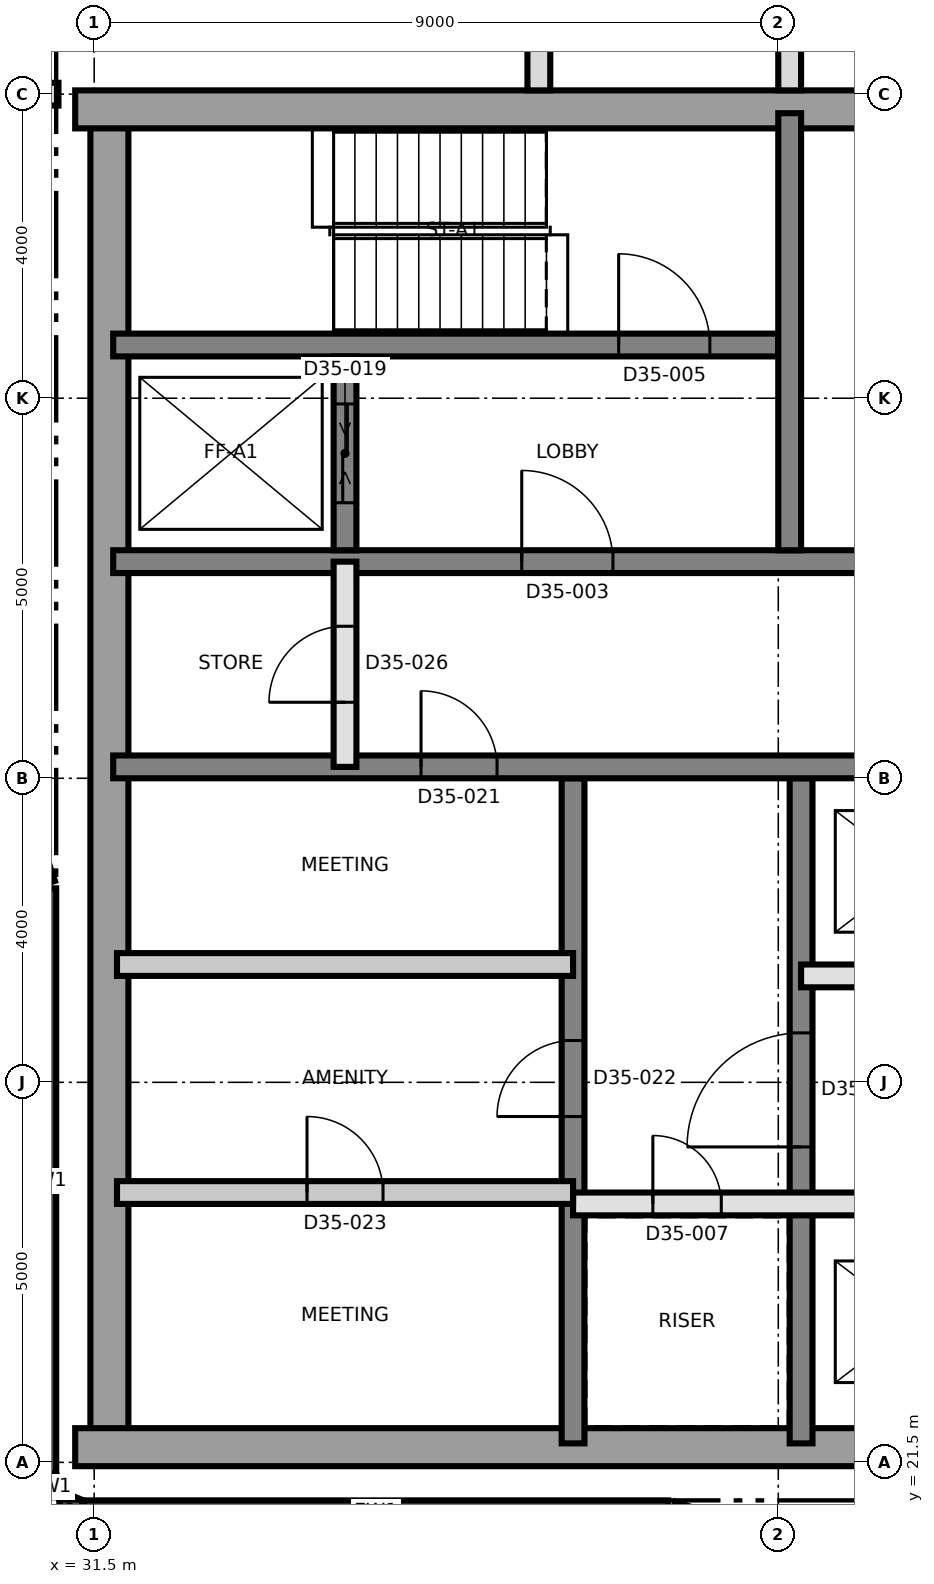
"""IFC4 building model, lengths in metres.
Left out: names, types, materials, properties, quantities, classifications, styles, units other than length and angle.
Written with IfcOpenShell. Run it as: python <this file> out.ifc"""

import sys

from ifc_helpers import new_model, si_unit, direction, frame, frame_2d, origin, place, context, subcontext, project, spatial, rectangle, extrude, element, fill, save


model = new_model("IFC4")
c1 = context("Model", 3, precision=1e-05, world=origin(), true_north=direction((0.0, 1.0)))
c2 = subcontext(c1, "Body", "Model", "MODEL_VIEW")
j1 = project(units=[si_unit("LENGTHUNIT", "METRE"), si_unit("PLANEANGLEUNIT", "RADIAN")], contexts=[c1])
p1 = place(None, origin())
s1 = spatial("IfcSite", under=j1, at=p1, CompositionType="ELEMENT")
p2 = place(p1, origin())
s2 = spatial("IfcBuilding", under=s1, at=p2, CompositionType="ELEMENT")
p3 = place(p2, frame((0.0, 0.0, 195.8)))
s3 = spatial("IfcBuildingStorey", under=s2, at=p3, CompositionType="ELEMENT", Elevation=195.8)
p4 = place(p3, frame((31.7, 21.75, 0.0), z_axis=(0.0, 0.0, 1.0), x_axis=(0.0, 1.0, 0.0)))
e1 = element("IfcWall", 1, at=p4, inside=s3, PredefinedType="SHEAR", context=c2, shape_type="SweptSolid", body=[
    extrude(rectangle(XDim=17.5, YDim=0.5, at=frame_2d((8.75, 0.0))), origin(), (0.0, 0.0, 1.0), 3.7),
])
p5 = place(p3, frame((31.25, 21.7, 0.0), z_axis=(0.0, 0.0, 1.0), x_axis=(1.0, 0.0, 0.0)))
e2 = element("IfcWall", 2, at=p5, inside=s3, PredefinedType="SHEAR", context=c2, shape_type="SweptSolid", body=[
    extrude(rectangle(XDim=27.0, YDim=0.5, at=frame_2d((13.5, 0.0))), origin(), (0.0, 0.0, 1.0), 3.7),
])
p6 = place(p3, frame((31.25, 39.3, 0.0), z_axis=(0.0, 0.0, 1.0), x_axis=(1.0, 0.0, 0.0)))
e3 = element("IfcWall", 3, at=p6, inside=s3, PredefinedType="SHEAR", context=c2, shape_type="SweptSolid", body=[
    extrude(rectangle(XDim=27.0, YDim=0.5, at=frame_2d((13.5, 0.0))), origin(), (0.0, 0.0, 1.0), 3.7),
])
p7 = place(p6, frame((10.45, 0.0, 0.0)))
e4 = element("IfcOpeningElement", 4, at=p7, cuts=e3, PredefinedType="OPENING", context=c2, shape_type="SweptSolid", body=[
    extrude(rectangle(XDim=1.2, YDim=2.1, at=frame_2d((0.6, 1.05))), frame((0.0, 0.26, 0.0), z_axis=(0.0, -1.0, 0.0), x_axis=(1.0, 0.0, 0.0)), (0.0, 0.0, 1.0), 0.52),
])
p8 = place(p3, frame((37.8, 21.75, 0.0), z_axis=(0.0, 0.0, 1.0), x_axis=(0.0, 1.0, 0.0)))
e5 = element("IfcWall", 5, at=p8, inside=s3, PredefinedType="SHEAR", context=c2, shape_type="SweptSolid", body=[
    extrude(rectangle(XDim=8.75, YDim=0.3, at=frame_2d((4.375, 0.0))), origin(), (0.0, 0.0, 1.0), 3.7),
])
p9 = place(p8, frame((4.3, 0.0, 0.0)))
e6 = element("IfcOpeningElement", 6, at=p9, cuts=e5, PredefinedType="OPENING", context=c2, shape_type="SweptSolid", body=[
    extrude(rectangle(XDim=1.0, YDim=2.1, at=frame_2d((0.5, 1.05))), frame((0.0, 0.16, 0.0), z_axis=(0.0, -1.0, 0.0), x_axis=(1.0, 0.0, 0.0)), (0.0, 0.0, 1.0), 0.32),
])
p10 = place(p3, frame((40.8, 21.75, 0.0), z_axis=(0.0, 0.0, 1.0), x_axis=(0.0, 1.0, 0.0)))
e7 = element("IfcWall", 7, at=p10, inside=s3, PredefinedType="SHEAR", context=c2, shape_type="SweptSolid", body=[
    extrude(rectangle(XDim=8.75, YDim=0.3, at=frame_2d((4.375, 0.0))), origin(), (0.0, 0.0, 1.0), 3.7),
])
p11 = place(p10, frame((3.9, 0.0, 0.0)))
e8 = element("IfcOpeningElement", 8, at=p11, cuts=e7, PredefinedType="OPENING", context=c2, shape_type="SweptSolid", body=[
    extrude(rectangle(XDim=1.5, YDim=2.1, at=frame_2d((0.75, 1.05))), frame((0.0, 0.16, 0.0), z_axis=(0.0, -1.0, 0.0), x_axis=(1.0, 0.0, 0.0)), (0.0, 0.0, 1.0), 0.32),
])
p12 = place(p3, frame((31.75, 30.65, 0.0), z_axis=(0.0, 0.0, 1.0), x_axis=(1.0, 0.0, 0.0)))
e9 = element("IfcWall", 9, at=p12, inside=s3, PredefinedType="SHEAR", context=c2, shape_type="SweptSolid", body=[
    extrude(rectangle(XDim=26.5, YDim=0.3, at=frame_2d((13.25, 0.0))), origin(), (0.0, 0.0, 1.0), 3.7),
])
p13 = place(p12, frame((24.75, 0.0, 0.0)))
e10 = element("IfcOpeningElement", 10, at=p13, cuts=e9, PredefinedType="OPENING", context=c2, shape_type="SweptSolid", body=[
    extrude(rectangle(XDim=1.0, YDim=2.1, at=frame_2d((0.5, 1.05))), frame((0.0, 0.16, 0.0), z_axis=(0.0, -1.0, 0.0), x_axis=(1.0, 0.0, 0.0)), (0.0, 0.0, 1.0), 0.32),
])
p14 = place(p12, frame((4.05, 0.0, 0.0)))
e11 = element("IfcOpeningElement", 11, at=p14, cuts=e9, PredefinedType="OPENING", context=c2, shape_type="SweptSolid", body=[
    extrude(rectangle(XDim=1.0, YDim=2.1, at=frame_2d((0.5, 1.05))), frame((0.0, 0.16, 0.0), z_axis=(0.0, -1.0, 0.0), x_axis=(1.0, 0.0, 0.0)), (0.0, 0.0, 1.0), 0.32),
])
p15 = place(p3, frame((31.75, 33.35, 0.0), z_axis=(0.0, 0.0, 1.0), x_axis=(1.0, 0.0, 0.0)))
e12 = element("IfcWall", 12, at=p15, inside=s3, PredefinedType="SHEAR", context=c2, shape_type="SweptSolid", body=[
    extrude(rectangle(XDim=26.5, YDim=0.3, at=frame_2d((13.25, 0.0))), origin(), (0.0, 0.0, 1.0), 3.7),
])
p16 = place(p15, frame((13.9, 0.0, 0.0)))
e13 = element("IfcOpeningElement", 13, at=p16, cuts=e12, PredefinedType="OPENING", context=c2, shape_type="SweptSolid", body=[
    extrude(rectangle(XDim=1.4, YDim=2.1, at=frame_2d((0.7, 1.05))), frame((0.0, 0.16, 0.0), z_axis=(0.0, -1.0, 0.0), x_axis=(1.0, 0.0, 0.0)), (0.0, 0.0, 1.0), 0.32),
])
p17 = place(p15, frame((5.375, 0.0, 0.0)))
e14 = element("IfcOpeningElement", 14, at=p17, cuts=e12, PredefinedType="OPENING", context=c2, shape_type="SweptSolid", body=[
    extrude(rectangle(XDim=1.2, YDim=2.1, at=frame_2d((0.6, 1.05))), frame((0.0, 0.16, 0.0), z_axis=(0.0, -1.0, 0.0), x_axis=(1.0, 0.0, 0.0)), (0.0, 0.0, 1.0), 0.32),
])
p18 = place(p15, frame((19.925, 0.0, 0.0)))
e15 = element("IfcOpeningElement", 15, at=p18, cuts=e12, PredefinedType="OPENING", context=c2, shape_type="SweptSolid", body=[
    extrude(rectangle(XDim=1.2, YDim=2.1, at=frame_2d((0.6, 1.05))), frame((0.0, 0.16, 0.0), z_axis=(0.0, -1.0, 0.0), x_axis=(1.0, 0.0, 0.0)), (0.0, 0.0, 1.0), 0.32),
])
p19 = place(p3, frame((31.75, 36.2, 0.0), z_axis=(0.0, 0.0, 1.0), x_axis=(1.0, 0.0, 0.0)))
e16 = element("IfcWall", 16, at=p19, inside=s3, PredefinedType="SHEAR", context=c2, shape_type="SweptSolid", body=[
    extrude(rectangle(XDim=8.75, YDim=0.3, at=frame_2d((4.375, 0.0))), origin(), (0.0, 0.0, 1.0), 3.7),
])
p20 = place(p19, frame((6.65, 0.0, 0.0)))
e17 = element("IfcOpeningElement", 17, at=p20, cuts=e16, PredefinedType="OPENING", context=c2, shape_type="SweptSolid", body=[
    extrude(rectangle(XDim=1.2, YDim=2.1, at=frame_2d((0.6, 1.05))), frame((0.0, 0.16, 0.0), z_axis=(0.0, -1.0, 0.0), x_axis=(1.0, 0.0, 0.0)), (0.0, 0.0, 1.0), 0.32),
])
p21 = place(p3, frame((40.65, 33.5, 0.0), z_axis=(0.0, 0.0, 1.0), x_axis=(0.0, 1.0, 0.0)))
e18 = element("IfcWall", 18, at=p21, inside=s3, PredefinedType="SHEAR", context=c2, shape_type="SweptSolid", body=[
    extrude(rectangle(XDim=5.75, YDim=0.3, at=frame_2d((2.875, 0.0))), origin(), (0.0, 0.0, 1.0), 3.7),
])
p22 = place(p3, frame((34.8, 33.5, 0.0), z_axis=(0.0, 0.0, 1.0), x_axis=(0.0, 1.0, 0.0)))
e19 = element("IfcWall", 19, at=p22, inside=s3, PredefinedType="SHEAR", context=c2, shape_type="SweptSolid", body=[
    extrude(rectangle(XDim=2.55, YDim=0.3, at=frame_2d((1.275, 0.0))), origin(), (0.0, 0.0, 1.0), 3.7),
])
p23 = place(p22, frame((0.625, 0.0, 0.0)))
e20 = element("IfcOpeningElement", 20, at=p23, cuts=e19, PredefinedType="OPENING", context=c2, shape_type="SweptSolid", body=[
    extrude(rectangle(XDim=1.3, YDim=2.4, at=frame_2d((0.65, 1.2))), frame((0.0, 0.16, 0.0), z_axis=(0.0, -1.0, 0.0), x_axis=(1.0, 0.0, 0.0)), (0.0, 0.0, 1.0), 0.32),
])
p24 = place(p3, frame((30.85, 29.052, 0.0), z_axis=(0.0, 0.0, 1.0), x_axis=(0.0, -1.0, 0.0)))
e21 = element("IfcWall", 21, at=p24, inside=s3, PredefinedType="SOLIDWALL", context=c2, shape_type="SweptSolid", body=[
    extrude(rectangle(XDim=7.693, YDim=0.3, at=frame_2d((3.846, 0.0))), origin(), (0.0, 0.0, 1.0), 3.4),
])
for number, where, z_axis, x_axis in (
    (22, (30.861, 21.302, 0.0), (0.0, 0.0, 1.0), (0.383, -0.924, 0.0)),
    (23, (31.048, 20.967, 0.0), (0.0, 0.0, 1.0), (0.924, -0.383, 0.0)),
):
    element("IfcWall", number, at=place(p3, frame(where, z_axis=z_axis, x_axis=x_axis)), inside=s3, PredefinedType="SOLIDWALL", context=c2, shape_type="SweptSolid", body=[
        extrude(rectangle(XDim=0.275, YDim=0.3, at=frame_2d((0.138, 0.0))), origin(), (0.0, 0.0, 1.0), 3.4),
    ])
p25 = place(p3, frame((31.36, 20.85, 0.0), z_axis=(0.0, 0.0, 1.0), x_axis=(1.0, 0.0, 0.0)))
e24 = element("IfcWall", 24, at=p25, inside=s3, PredefinedType="SOLIDWALL", context=c2, shape_type="SweptSolid", body=[
    extrude(rectangle(XDim=7.693, YDim=0.3, at=frame_2d((3.846, 0.0))), origin(), (0.0, 0.0, 1.0), 3.4),
])
for number, where, z_axis, x_axis in (
    (25, (39.101, 20.842, 0.0), (0.0, 0.0, 1.0), (0.947, -0.321, 0.0)),
    (26, (30.418, 30.351, 0.0), (0.0, 0.0, 1.0), (0.321, -0.947, 0.0)),
):
    element("IfcWall", number, at=place(p3, frame(where, z_axis=z_axis, x_axis=x_axis)), inside=s3, PredefinedType="SOLIDWALL", context=c2, shape_type="SweptSolid", body=[
        extrude(rectangle(XDim=1.32, YDim=0.3, at=frame_2d((0.66, 0.0))), origin(), (0.0, 0.0, 1.0), 3.4),
    ])
p26 = place(p3, frame((37.8, 24.9, 0.0), z_axis=(0.0, 0.0, 1.0), x_axis=(1.0, 0.0, 0.0)))
e27 = element("IfcWall", 27, at=p26, inside=s3, PredefinedType="SOLIDWALL", context=c2, shape_type="SweptSolid", body=[
    extrude(rectangle(XDim=12.0, YDim=0.3, at=frame_2d((6.0, 0.0))), origin(), (0.0, 0.0, 1.0), 3.4),
])
p27 = place(p26, frame((1.05, 0.0, 0.0)))
e28 = element("IfcOpeningElement", 28, at=p27, cuts=e27, PredefinedType="OPENING", context=c2, shape_type="SweptSolid", body=[
    extrude(rectangle(XDim=0.9, YDim=2.1, at=frame_2d((0.45, 1.05))), frame((0.0, 0.16, 0.0), z_axis=(0.0, -1.0, 0.0), x_axis=(1.0, 0.0, 0.0)), (0.0, 0.0, 1.0), 0.32),
])
p28 = place(p26, frame((10.05, 0.0, 0.0)))
e29 = element("IfcOpeningElement", 29, at=p28, cuts=e27, PredefinedType="OPENING", context=c2, shape_type="SweptSolid", body=[
    extrude(rectangle(XDim=0.9, YDim=2.1, at=frame_2d((0.45, 1.05))), frame((0.0, 0.16, 0.0), z_axis=(0.0, -1.0, 0.0), x_axis=(1.0, 0.0, 0.0)), (0.0, 0.0, 1.0), 0.32),
])
p29 = place(p26, frame((3.95, 0.0, 0.0)))
e30 = element("IfcOpeningElement", 30, at=p29, cuts=e27, PredefinedType="OPENING", context=c2, shape_type="SweptSolid", body=[
    extrude(rectangle(XDim=1.1, YDim=2.4, at=frame_2d((0.55, 1.2))), frame((0.0, 0.16, 0.0), z_axis=(0.0, -1.0, 0.0), x_axis=(1.0, 0.0, 0.0)), (0.0, 0.0, 1.0), 0.32),
])
p30 = place(p26, frame((6.95, 0.0, 0.0)))
e31 = element("IfcOpeningElement", 31, at=p30, cuts=e27, PredefinedType="OPENING", context=c2, shape_type="SweptSolid", body=[
    extrude(rectangle(XDim=1.1, YDim=2.4, at=frame_2d((0.55, 1.2))), frame((0.0, 0.16, 0.0), z_axis=(0.0, -1.0, 0.0), x_axis=(1.0, 0.0, 0.0)), (0.0, 0.0, 1.0), 0.32),
])
p31 = place(p3, frame((31.8, 25.05, 0.0), z_axis=(0.0, 0.0, 1.0), x_axis=(1.0, 0.0, 0.0)))
e32 = element("IfcWall", 32, at=p31, inside=s3, PredefinedType="PARTITIONING", context=c2, shape_type="SweptSolid", body=[
    extrude(rectangle(XDim=6.0, YDim=0.3, at=frame_2d((3.0, 0.0))), origin(), (0.0, 0.0, 1.0), 3.4),
])
p32 = place(p31, frame((2.5, 0.0, 0.0)))
e33 = element("IfcOpeningElement", 33, at=p32, cuts=e32, PredefinedType="OPENING", context=c2, shape_type="SweptSolid", body=[
    extrude(rectangle(XDim=1.0, YDim=2.1, at=frame_2d((0.5, 1.05))), frame((0.0, 0.16, 0.0), z_axis=(0.0, -1.0, 0.0), x_axis=(1.0, 0.0, 0.0)), (0.0, 0.0, 1.0), 0.32),
])
p33 = place(p3, frame((40.8, 27.9, 0.0), z_axis=(0.0, 0.0, 1.0), x_axis=(1.0, 0.0, 0.0)))
e34 = element("IfcWall", 34, at=p33, inside=s3, PredefinedType="SOLIDWALL", context=c2, shape_type="SweptSolid", body=[
    extrude(rectangle(XDim=6.0, YDim=0.3, at=frame_2d((3.0, 0.0))), origin(), (0.0, 0.0, 1.0), 3.4),
])
p34 = place(p33, frame((0.95, 0.0, 0.0)))
e35 = element("IfcOpeningElement", 35, at=p34, cuts=e34, PredefinedType="OPENING", context=c2, shape_type="SweptSolid", body=[
    extrude(rectangle(XDim=1.1, YDim=2.4, at=frame_2d((0.55, 1.2))), frame((0.0, 0.16, 0.0), z_axis=(0.0, -1.0, 0.0), x_axis=(1.0, 0.0, 0.0)), (0.0, 0.0, 1.0), 0.32),
])
p35 = place(p33, frame((3.95, 0.0, 0.0)))
e36 = element("IfcOpeningElement", 36, at=p35, cuts=e34, PredefinedType="OPENING", context=c2, shape_type="SweptSolid", body=[
    extrude(rectangle(XDim=1.1, YDim=2.4, at=frame_2d((0.55, 1.2))), frame((0.0, 0.16, 0.0), z_axis=(0.0, -1.0, 0.0), x_axis=(1.0, 0.0, 0.0)), (0.0, 0.0, 1.0), 0.32),
])
p36 = place(p3, frame((31.8, 28.05, 0.0), z_axis=(0.0, 0.0, 1.0), x_axis=(1.0, 0.0, 0.0)))
e37 = element("IfcWall", 37, at=p36, inside=s3, PredefinedType="PARTITIONING", context=c2, shape_type="SweptSolid", body=[
    extrude(rectangle(XDim=6.0, YDim=0.3, at=frame_2d((3.0, 0.0))), origin(), (0.0, 0.0, 1.0), 3.4),
])
p37 = place(p3, frame((34.8, 30.65, 0.0), z_axis=(0.0, 0.0, 1.0), x_axis=(0.0, 1.0, 0.0)))
e38 = element("IfcWall", 38, at=p37, inside=s3, PredefinedType="SOLIDWALL", context=c2, shape_type="SweptSolid", body=[
    extrude(rectangle(XDim=2.7, YDim=0.3, at=frame_2d((1.35, 0.0))), origin(), (0.0, 0.0, 1.0), 3.4),
])
p38 = place(p37, frame((0.85, 0.0, 0.0)))
e39 = element("IfcOpeningElement", 39, at=p38, cuts=e38, PredefinedType="OPENING", context=c2, shape_type="SweptSolid", body=[
    extrude(rectangle(XDim=1.0, YDim=2.1, at=frame_2d((0.5, 1.05))), frame((0.0, 0.16, 0.0), z_axis=(0.0, -1.0, 0.0), x_axis=(1.0, 0.0, 0.0)), (0.0, 0.0, 1.0), 0.32),
])
p39 = place(p3, frame((30.135, 39.5, 0.0), z_axis=(0.0, 0.0, 1.0), x_axis=(1.0, 0.0, 0.0)))
e40 = element("IfcWall", 40, at=p39, inside=s3, PredefinedType="PARTITIONING", context=c2, shape_type="SweptSolid", body=[
    extrude(rectangle(XDim=0.895, YDim=0.3, at=frame_2d((0.448, 0.0))), origin(), (0.0, 0.0, 1.0), 3.4),
])
p40 = place(p3, frame((37.35, 39.55, 0.0), z_axis=(0.0, 0.0, 1.0), x_axis=(0.0, 1.0, 0.0)))
e41 = element("IfcWall", 41, at=p40, inside=s3, PredefinedType="PARTITIONING", context=c2, shape_type="SweptSolid", body=[
    extrude(rectangle(XDim=2.95, YDim=0.3, at=frame_2d((1.475, 0.0))), origin(), (0.0, 0.0, 1.0), 3.4),
])
p41 = place(p40, frame((1.05, 0.0, 0.0)))
e42 = element("IfcOpeningElement", 42, at=p41, cuts=e41, PredefinedType="OPENING", context=c2, shape_type="SweptSolid", body=[
    extrude(rectangle(XDim=0.8, YDim=2.1, at=frame_2d((0.4, 1.05))), frame((0.0, 0.16, 0.0), z_axis=(0.0, -1.0, 0.0), x_axis=(1.0, 0.0, 0.0)), (0.0, 0.0, 1.0), 0.32),
])
p42 = place(p3, frame((40.65, 39.55, 0.0), z_axis=(0.0, 0.0, 1.0), x_axis=(0.0, 1.0, 0.0)))
e43 = element("IfcWall", 43, at=p42, inside=s3, PredefinedType="PARTITIONING", context=c2, shape_type="SweptSolid", body=[
    extrude(rectangle(XDim=19.0, YDim=0.3, at=frame_2d((9.5, 0.0))), origin(), (0.0, 0.0, 1.0), 3.4),
])
p43 = place(p42, frame((3.95, 0.0, 0.0)))
e44 = element("IfcOpeningElement", 44, at=p43, cuts=e43, PredefinedType="OPENING", context=c2, shape_type="SweptSolid", body=[
    extrude(rectangle(XDim=1.0, YDim=2.4, at=frame_2d((0.5, 1.2))), frame((0.0, 0.16, 0.0), z_axis=(0.0, -1.0, 0.0), x_axis=(1.0, 0.0, 0.0)), (0.0, 0.0, 1.0), 0.32),
])
p44 = place(p42, frame((12.05, 0.0, 0.0)))
e45 = element("IfcOpeningElement", 45, at=p44, cuts=e43, PredefinedType="OPENING", context=c2, shape_type="SweptSolid", body=[
    extrude(rectangle(XDim=1.0, YDim=2.1, at=frame_2d((0.5, 1.05))), frame((0.0, 0.16, 0.0), z_axis=(0.0, -1.0, 0.0), x_axis=(1.0, 0.0, 0.0)), (0.0, 0.0, 1.0), 0.32),
])
p45 = place(p42, frame((13.85, 0.0, 0.0)))
e46 = element("IfcOpeningElement", 46, at=p45, cuts=e43, PredefinedType="OPENING", context=c2, shape_type="SweptSolid", body=[
    extrude(rectangle(XDim=1.0, YDim=2.1, at=frame_2d((0.5, 1.05))), frame((0.0, 0.16, 0.0), z_axis=(0.0, -1.0, 0.0), x_axis=(1.0, 0.0, 0.0)), (0.0, 0.0, 1.0), 0.32),
])
p46 = place(p11, origin())
e47 = element("IfcDoor", 47, at=p46, inside=s3, OperationType="SINGLE_SWING_RIGHT", PredefinedType="DOOR", context=c2, shape_type="SweptSolid", body=[
    extrude(rectangle(XDim=1.5, YDim=2.1, at=frame_2d((0.75, 1.05))), frame((0.0, 0.025, 0.0), z_axis=(0.0, -1.0, 0.0), x_axis=(1.0, 0.0, 0.0)), (0.0, 0.0, 1.0), 0.05),
])
fill(e8, e47)
p47 = place(p17, origin())
e48 = element("IfcDoor", 48, at=p47, inside=s3, OperationType="SINGLE_SWING_LEFT", PredefinedType="DOOR", context=c2, shape_type="SweptSolid", body=[
    extrude(rectangle(XDim=1.2, YDim=2.1, at=frame_2d((0.6, 1.05))), frame((0.0, 0.025, 0.0), z_axis=(0.0, -1.0, 0.0), x_axis=(1.0, 0.0, 0.0)), (0.0, 0.0, 1.0), 0.05),
])
fill(e14, e48)
p48 = place(p20, origin())
e49 = element("IfcDoor", 49, at=p48, inside=s3, OperationType="SINGLE_SWING_RIGHT", PredefinedType="DOOR", context=c2, shape_type="SweptSolid", body=[
    extrude(rectangle(XDim=1.2, YDim=2.1, at=frame_2d((0.6, 1.05))), frame((0.0, 0.025, 0.0), z_axis=(0.0, -1.0, 0.0), x_axis=(1.0, 0.0, 0.0)), (0.0, 0.0, 1.0), 0.05),
])
fill(e17, e49)
p49 = place(p27, origin())
e50 = element("IfcDoor", 50, at=p49, inside=s3, OperationType="SINGLE_SWING_LEFT", PredefinedType="DOOR", context=c2, shape_type="SweptSolid", body=[
    extrude(rectangle(XDim=0.9, YDim=2.1, at=frame_2d((0.45, 1.05))), frame((0.0, 0.025, 0.0), z_axis=(0.0, -1.0, 0.0), x_axis=(1.0, 0.0, 0.0)), (0.0, 0.0, 1.0), 0.05),
])
fill(e28, e50)
p50 = place(p23, origin())
e51 = element("IfcDoor", 51, at=p50, inside=s3, OperationType="SLIDING_TO_LEFT", PredefinedType="DOOR", context=c2, shape_type="SweptSolid", body=[
    extrude(rectangle(XDim=1.3, YDim=2.4, at=frame_2d((0.65, 1.2))), frame((0.0, 0.025, 0.0), z_axis=(0.0, -1.0, 0.0), x_axis=(1.0, 0.0, 0.0)), (0.0, 0.0, 1.0), 0.05),
])
fill(e20, e51)
p51 = place(p14, origin())
e52 = element("IfcDoor", 52, at=p51, inside=s3, OperationType="SINGLE_SWING_LEFT", PredefinedType="DOOR", context=c2, shape_type="SweptSolid", body=[
    extrude(rectangle(XDim=1.0, YDim=2.1, at=frame_2d((0.5, 1.05))), frame((0.0, 0.025, 0.0), z_axis=(0.0, -1.0, 0.0), x_axis=(1.0, 0.0, 0.0)), (0.0, 0.0, 1.0), 0.05),
])
fill(e11, e52)
p52 = place(p9, origin())
e53 = element("IfcDoor", 53, at=p52, inside=s3, OperationType="SINGLE_SWING_RIGHT", PredefinedType="DOOR", context=c2, shape_type="SweptSolid", body=[
    extrude(rectangle(XDim=1.0, YDim=2.1, at=frame_2d((0.5, 1.05))), frame((0.0, 0.025, 0.0), z_axis=(0.0, -1.0, 0.0), x_axis=(1.0, 0.0, 0.0)), (0.0, 0.0, 1.0), 0.05),
])
fill(e6, e53)
p53 = place(p32, origin())
e54 = element("IfcDoor", 54, at=p53, inside=s3, OperationType="SINGLE_SWING_RIGHT", PredefinedType="DOOR", context=c2, shape_type="SweptSolid", body=[
    extrude(rectangle(XDim=1.0, YDim=2.1, at=frame_2d((0.5, 1.05))), frame((0.0, 0.025, 0.0), z_axis=(0.0, -1.0, 0.0), x_axis=(1.0, 0.0, 0.0)), (0.0, 0.0, 1.0), 0.05),
])
fill(e33, e54)
p54 = place(p38, origin())
e55 = element("IfcDoor", 55, at=p54, inside=s3, OperationType="SINGLE_SWING_RIGHT", PredefinedType="DOOR", context=c2, shape_type="SweptSolid", body=[
    extrude(rectangle(XDim=1.0, YDim=2.1, at=frame_2d((0.5, 1.05))), frame((0.0, 0.025, 0.0), z_axis=(0.0, -1.0, 0.0), x_axis=(1.0, 0.0, 0.0)), (0.0, 0.0, 1.0), 0.05),
])
fill(e39, e55)
save(model, sys.argv[1])
